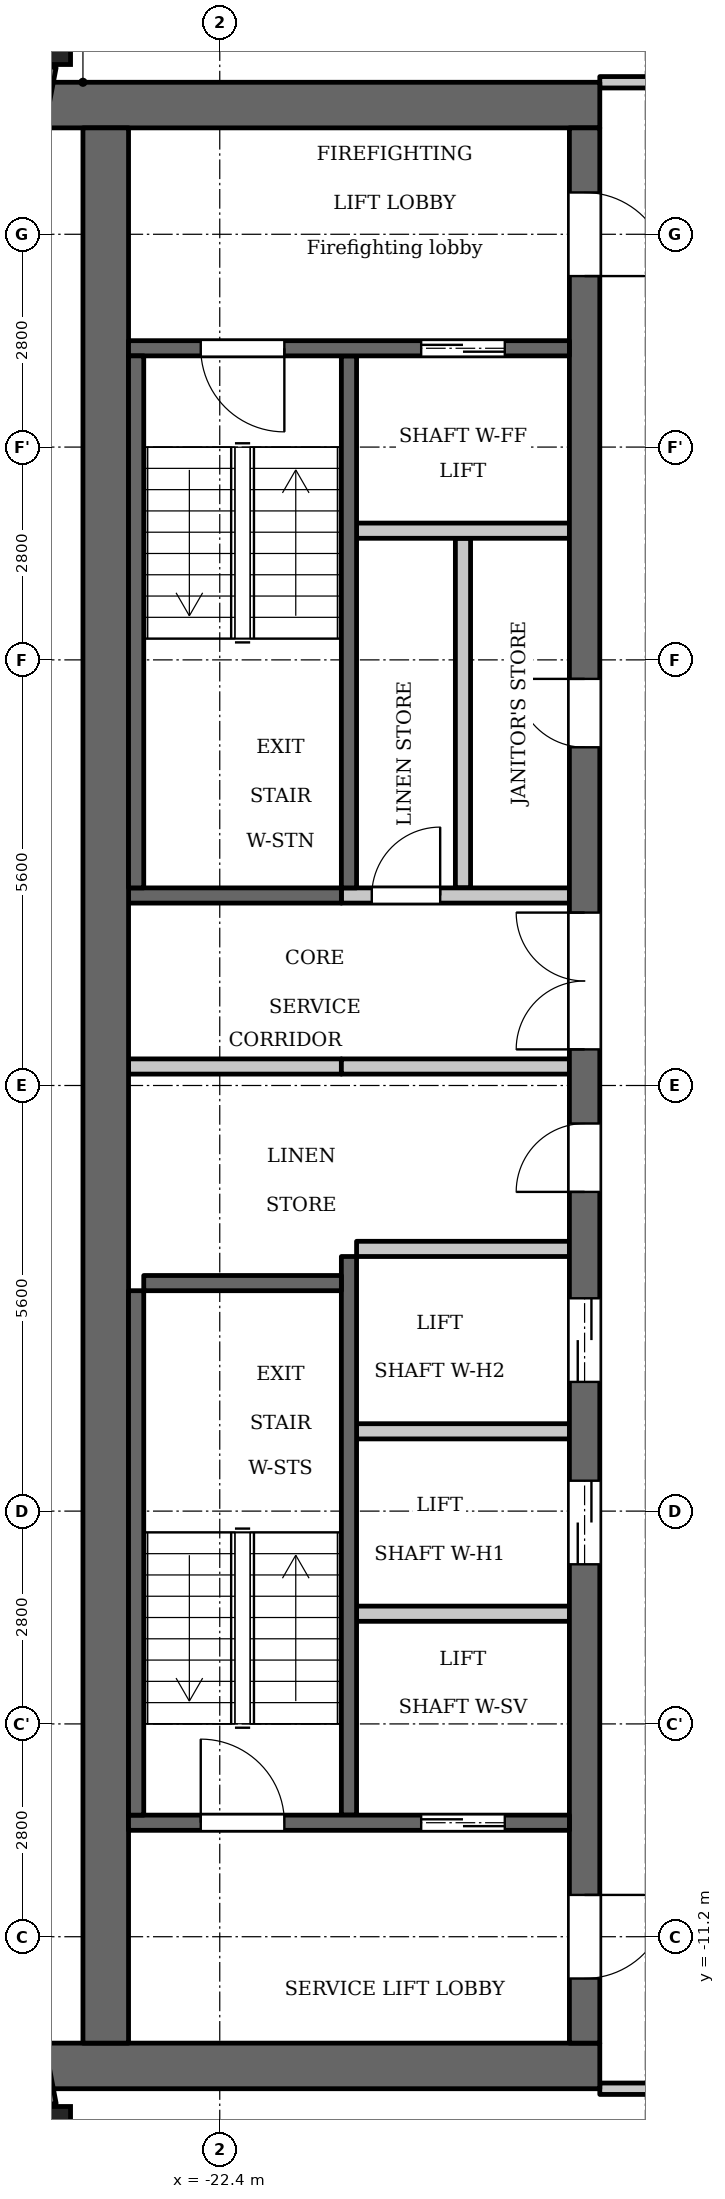
"""IFC4 building model, lengths in metres.
Left out: names, types, materials, properties, quantities, classifications, styles, units other than length and angle.
Written with IfcOpenShell. Run it as: python <this file> out.ifc"""

import sys

from ifc_helpers import new_model, si_unit, direction, frame, frame_2d, origin, origin_2d, place, context, subcontext, project, spatial, rectangle, extrude, element, fill, save


model = new_model("IFC4")
c1 = context("Model", 3, precision=1e-05, world=origin(), true_north=direction((0.0, 1.0)))
c2 = subcontext(c1, "Body", "Model", "MODEL_VIEW")
j1 = project(units=[si_unit("LENGTHUNIT", "METRE"), si_unit("PLANEANGLEUNIT", "RADIAN")], contexts=[c1])
p1 = place(None, origin())
s1 = spatial("IfcSite", under=j1, at=p1, CompositionType="ELEMENT")
p2 = place(p1, origin())
s2 = spatial("IfcBuilding", under=s1, at=p2, CompositionType="ELEMENT")
p3 = place(p2, frame((0.0, 0.0, 280.2)))
s3 = spatial("IfcBuildingStorey", under=s2, at=p3, CompositionType="ELEMENT", Elevation=280.2)
for number, where, z_axis, x_axis in (
    (1, (-24.738, 13.809, 0.0), (0.0, 0.0, 1.0), (1.0, 0.0, 0.0)),
    (2, (-24.738, -13.809, 0.0), (0.0, 0.0, 1.0), (1.0, 0.0, 0.0)),
):
    element("IfcColumn", number, at=place(p3, frame(where, z_axis=z_axis, x_axis=x_axis)), inside=s3, PredefinedType="COLUMN", context=c2, shape_type="SweptSolid", body=[
        extrude(rectangle(XDim=0.75, YDim=0.75, at=origin_2d()), origin(), (0.0, 0.0, 1.0), 3.5),
    ])
for number, where, z_axis, x_axis in (
    (3, (-24.7, 13.42, 0.0), (0.0, 0.0, 1.0), (-0.187, -0.982, 0.0)),
    (4, (-25.053, -11.572, 0.0), (0.0, 0.0, 1.0), (0.187, -0.982, 0.0)),
):
    element("IfcWall", number, at=place(p3, frame(where, z_axis=z_axis, x_axis=x_axis)), inside=s3, PredefinedType="SOLIDWALL", context=c2, shape_type="SweptSolid", body=[
        extrude(rectangle(XDim=1.881, YDim=0.3, at=frame_2d((0.941, 0.0))), origin(), (0.0, 0.0, 1.0), 2.5),
    ])
p4 = place(p3, frame((-20.7, 2.6, 0.0), z_axis=(0.0, 0.0, 1.0), x_axis=(0.0, 1.0, 0.0)))
e5 = element("IfcWall", 5, at=p4, inside=s3, PredefinedType="SHEAR", context=c2, shape_type="SweptSolid", body=[
    extrude(rectangle(XDim=7.0, YDim=0.2, at=frame_2d((3.5, 0.0))), origin(), (0.0, 0.0, 1.0), 3.15),
])
p5 = place(p3, frame((-20.7, -9.6, 0.0), z_axis=(0.0, 0.0, 1.0), x_axis=(0.0, 1.0, 0.0)))
e6 = element("IfcWall", 6, at=p5, inside=s3, PredefinedType="SHEAR", context=c2, shape_type="SweptSolid", body=[
    extrude(rectangle(XDim=7.35, YDim=0.2, at=frame_2d((3.675, 0.0))), origin(), (0.0, 0.0, 1.0), 3.15),
])
p6 = place(p3, frame((-20.8, 2.5, 0.0), z_axis=(0.0, 0.0, 1.0), x_axis=(-1.0, 0.0, 0.0)))
e7 = element("IfcWall", 7, at=p6, inside=s3, PredefinedType="SHEAR", context=c2, shape_type="SweptSolid", body=[
    extrude(rectangle(XDim=2.8, YDim=0.2, at=frame_2d((1.4, 0.0))), origin(), (0.0, 0.0, 1.0), 3.15),
])
p7 = place(p3, frame((-20.8, 0.25, 0.0), z_axis=(0.0, 0.0, 1.0), x_axis=(-1.0, 0.0, 0.0)))
e8 = element("IfcWall", 8, at=p7, inside=s3, PredefinedType="PARTITIONING", context=c2, shape_type="SweptSolid", body=[
    extrude(rectangle(XDim=2.8, YDim=0.2, at=frame_2d((1.4, 0.0))), origin(), (0.0, 0.0, 1.0), 3.15),
])
for number, where, z_axis, x_axis in (
    (9, (-17.4, 12.9, 0.0), (0.0, 0.0, 1.0), (-1.0, 0.0, 0.0)),
    (10, (-17.4, -12.9, 0.0), (0.0, 0.0, 1.0), (-1.0, 0.0, 0.0)),
):
    element("IfcWall", number, at=place(p3, frame(where, z_axis=z_axis, x_axis=x_axis)), inside=s3, PredefinedType="SHEAR", context=c2, shape_type="SweptSolid", body=[
        extrude(rectangle(XDim=7.32, YDim=0.6, at=frame_2d((3.66, 0.0))), origin(), (0.0, 0.0, 1.0), 3.15),
    ])
p8 = place(p3, frame((-19.2, 2.6, 0.0), z_axis=(0.0, 0.0, 1.0), x_axis=(0.0, 1.0, 0.0)))
e11 = element("IfcWall", 11, at=p8, inside=s3, PredefinedType="PARTITIONING", context=c2, shape_type="SweptSolid", body=[
    extrude(rectangle(XDim=4.6, YDim=0.2, at=frame_2d((2.3, 0.0))), origin(), (0.0, 0.0, 1.0), 3.15),
])
p9 = place(p3, frame((-17.6, -12.6, 0.0), z_axis=(0.0, 0.0, 1.0), x_axis=(0.0, 1.0, 0.0)))
e12 = element("IfcWall", 12, at=p9, inside=s3, PredefinedType="SHEAR", context=c2, shape_type="SweptSolid", body=[
    extrude(rectangle(XDim=25.2, YDim=0.4, at=frame_2d((12.6, 0.0))), origin(), (0.0, 0.0, 1.0), 3.15),
])
p10 = place(p9, frame((6.3, 0.0, 0.0)))
e13 = element("IfcOpeningElement", 13, at=p10, cuts=e12, PredefinedType="OPENING", context=c2, shape_type="SweptSolid", body=[
    extrude(rectangle(XDim=1.1, YDim=2.1, at=frame_2d((0.55, 1.05))), frame((0.0, 0.21, 0.0), z_axis=(0.0, -1.0, 0.0), x_axis=(1.0, 0.0, 0.0)), (0.0, 0.0, 1.0), 0.42),
])
p11 = place(p9, frame((8.7, 0.0, 0.0)))
e14 = element("IfcOpeningElement", 14, at=p11, cuts=e12, PredefinedType="OPENING", context=c2, shape_type="SweptSolid", body=[
    extrude(rectangle(XDim=1.1, YDim=2.1, at=frame_2d((0.55, 1.05))), frame((0.0, 0.21, 0.0), z_axis=(0.0, -1.0, 0.0), x_axis=(1.0, 0.0, 0.0)), (0.0, 0.0, 1.0), 0.42),
])
p12 = place(p9, frame((11.2, 0.0, 0.0)))
e15 = element("IfcOpeningElement", 15, at=p12, cuts=e12, PredefinedType="OPENING", context=c2, shape_type="SweptSolid", body=[
    extrude(rectangle(XDim=0.9, YDim=2.1, at=frame_2d((0.45, 1.05))), frame((0.0, 0.21, 0.0), z_axis=(0.0, -1.0, 0.0), x_axis=(1.0, 0.0, 0.0)), (0.0, 0.0, 1.0), 0.42),
])
p13 = place(p9, frame((17.05, 0.0, 0.0)))
e16 = element("IfcOpeningElement", 16, at=p13, cuts=e12, PredefinedType="OPENING", context=c2, shape_type="SweptSolid", body=[
    extrude(rectangle(XDim=0.9, YDim=2.1, at=frame_2d((0.45, 1.05))), frame((0.0, 0.21, 0.0), z_axis=(0.0, -1.0, 0.0), x_axis=(1.0, 0.0, 0.0)), (0.0, 0.0, 1.0), 0.42),
])
p14 = place(p9, frame((23.25, 0.0, 0.0)))
e17 = element("IfcOpeningElement", 17, at=p14, cuts=e12, PredefinedType="OPENING", context=c2, shape_type="SweptSolid", body=[
    extrude(rectangle(XDim=1.1, YDim=2.1, at=frame_2d((0.55, 1.05))), frame((0.0, 0.21, 0.0), z_axis=(0.0, -1.0, 0.0), x_axis=(1.0, 0.0, 0.0)), (0.0, 0.0, 1.0), 0.42),
])
p15 = place(p9, frame((0.85, 0.0, 0.0)))
e18 = element("IfcOpeningElement", 18, at=p15, cuts=e12, PredefinedType="OPENING", context=c2, shape_type="SweptSolid", body=[
    extrude(rectangle(XDim=1.1, YDim=2.1, at=frame_2d((0.55, 1.05))), frame((0.0, 0.21, 0.0), z_axis=(0.0, -1.0, 0.0), x_axis=(1.0, 0.0, 0.0)), (0.0, 0.0, 1.0), 0.42),
])
p16 = place(p9, frame((13.075, 0.0, 0.0)))
e19 = element("IfcOpeningElement", 19, at=p16, cuts=e12, PredefinedType="OPENING", context=c2, shape_type="SweptSolid", body=[
    extrude(rectangle(XDim=1.8, YDim=2.1, at=frame_2d((0.9, 1.05))), frame((0.0, 0.21, 0.0), z_axis=(0.0, -1.0, 0.0), x_axis=(1.0, 0.0, 0.0)), (0.0, 0.0, 1.0), 0.42),
])
p17 = place(p3, frame((-23.9, -12.6, 0.0), z_axis=(0.0, 0.0, 1.0), x_axis=(0.0, 1.0, 0.0)))
e20 = element("IfcWall", 20, at=p17, inside=s3, PredefinedType="SHEAR", context=c2, shape_type="SweptSolid", body=[
    extrude(rectangle(XDim=25.2, YDim=0.6, at=frame_2d((12.6, 0.0))), origin(), (0.0, 0.0, 1.0), 3.15),
])
p18 = place(p3, frame((-17.8, -9.7, 0.0), z_axis=(0.0, 0.0, 1.0), x_axis=(-1.0, 0.0, 0.0)))
e21 = element("IfcWall", 21, at=p18, inside=s3, PredefinedType="SHEAR", context=c2, shape_type="SweptSolid", body=[
    extrude(rectangle(XDim=5.8, YDim=0.2, at=frame_2d((2.9, 0.0))), origin(), (0.0, 0.0, 1.0), 3.15),
])
p19 = place(p18, frame((0.85, 0.0, 0.0)))
e22 = element("IfcOpeningElement", 22, at=p19, cuts=e21, PredefinedType="OPENING", context=c2, shape_type="SweptSolid", body=[
    extrude(rectangle(XDim=1.1, YDim=2.1, at=frame_2d((0.55, 1.05))), frame((0.0, 0.11, 0.0), z_axis=(0.0, -1.0, 0.0), x_axis=(1.0, 0.0, 0.0)), (0.0, 0.0, 1.0), 0.22),
])
p20 = place(p18, frame((3.75, 0.0, 0.0)))
e23 = element("IfcOpeningElement", 23, at=p20, cuts=e21, PredefinedType="OPENING", context=c2, shape_type="SweptSolid", body=[
    extrude(rectangle(XDim=1.1, YDim=2.1, at=frame_2d((0.55, 1.05))), frame((0.0, 0.11, 0.0), z_axis=(0.0, -1.0, 0.0), x_axis=(1.0, 0.0, 0.0)), (0.0, 0.0, 1.0), 0.22),
])
for number, where, z_axis, x_axis in (
    (24, (-17.8, -6.95, 0.0), (0.0, 0.0, 1.0), (-1.0, 0.0, 0.0)),
    (25, (-17.8, -4.55, 0.0), (0.0, 0.0, 1.0), (-1.0, 0.0, 0.0)),
    (26, (-17.8, -2.15, 0.0), (0.0, 0.0, 1.0), (-1.0, 0.0, 0.0)),
):
    element("IfcWall", number, at=place(p3, frame(where, z_axis=z_axis, x_axis=x_axis)), inside=s3, PredefinedType="PARTITIONING", context=c2, shape_type="SweptSolid", body=[
        extrude(rectangle(XDim=2.8, YDim=0.2, at=frame_2d((1.4, 0.0))), origin(), (0.0, 0.0, 1.0), 3.15),
    ])
p21 = place(p3, frame((-17.8, 0.25, 0.0), z_axis=(0.0, 0.0, 1.0), x_axis=(-1.0, 0.0, 0.0)))
e27 = element("IfcWall", 27, at=p21, inside=s3, PredefinedType="PARTITIONING", context=c2, shape_type="SweptSolid", body=[
    extrude(rectangle(XDim=3.0, YDim=0.2, at=frame_2d((1.5, 0.0))), origin(), (0.0, 0.0, 1.0), 3.15),
])
p22 = place(p3, frame((-17.8, 2.5, 0.0), z_axis=(0.0, 0.0, 1.0), x_axis=(-1.0, 0.0, 0.0)))
e28 = element("IfcWall", 28, at=p22, inside=s3, PredefinedType="PARTITIONING", context=c2, shape_type="SweptSolid", body=[
    extrude(rectangle(XDim=3.0, YDim=0.2, at=frame_2d((1.5, 0.0))), origin(), (0.0, 0.0, 1.0), 3.15),
])
p23 = place(p22, frame((1.7, 0.0, 0.0)))
e29 = element("IfcOpeningElement", 29, at=p23, cuts=e28, PredefinedType="OPENING", context=c2, shape_type="SweptSolid", body=[
    extrude(rectangle(XDim=0.9, YDim=2.1, at=frame_2d((0.45, 1.05))), frame((0.0, 0.11, 0.0), z_axis=(0.0, -1.0, 0.0), x_axis=(1.0, 0.0, 0.0)), (0.0, 0.0, 1.0), 0.22),
])
p24 = place(p3, frame((-17.8, 7.3, 0.0), z_axis=(0.0, 0.0, 1.0), x_axis=(-1.0, 0.0, 0.0)))
e30 = element("IfcWall", 30, at=p24, inside=s3, PredefinedType="PARTITIONING", context=c2, shape_type="SweptSolid", body=[
    extrude(rectangle(XDim=2.8, YDim=0.2, at=frame_2d((1.4, 0.0))), origin(), (0.0, 0.0, 1.0), 3.15),
])
p25 = place(p3, frame((-17.8, 9.7, 0.0), z_axis=(0.0, 0.0, 1.0), x_axis=(-1.0, 0.0, 0.0)))
e31 = element("IfcWall", 31, at=p25, inside=s3, PredefinedType="SHEAR", context=c2, shape_type="SweptSolid", body=[
    extrude(rectangle(XDim=5.8, YDim=0.2, at=frame_2d((2.9, 0.0))), origin(), (0.0, 0.0, 1.0), 3.15),
])
p26 = place(p25, frame((0.85, 0.0, 0.0)))
e32 = element("IfcOpeningElement", 32, at=p26, cuts=e31, PredefinedType="OPENING", context=c2, shape_type="SweptSolid", body=[
    extrude(rectangle(XDim=1.1, YDim=2.1, at=frame_2d((0.55, 1.05))), frame((0.0, 0.11, 0.0), z_axis=(0.0, -1.0, 0.0), x_axis=(1.0, 0.0, 0.0)), (0.0, 0.0, 1.0), 0.22),
])
p27 = place(p25, frame((3.75, 0.0, 0.0)))
e33 = element("IfcOpeningElement", 33, at=p27, cuts=e31, PredefinedType="OPENING", context=c2, shape_type="SweptSolid", body=[
    extrude(rectangle(XDim=1.1, YDim=2.1, at=frame_2d((0.55, 1.05))), frame((0.0, 0.11, 0.0), z_axis=(0.0, -1.0, 0.0), x_axis=(1.0, 0.0, 0.0)), (0.0, 0.0, 1.0), 0.22),
])
p28 = place(p3, frame((-23.5, 2.6, 0.0), z_axis=(0.0, 0.0, 1.0), x_axis=(0.0, 1.0, 0.0)))
e34 = element("IfcWall", 34, at=p28, inside=s3, PredefinedType="SHEAR", context=c2, shape_type="SweptSolid", body=[
    extrude(rectangle(XDim=7.0, YDim=0.2, at=frame_2d((3.5, 0.0))), origin(), (0.0, 0.0, 1.0), 3.15),
])
p29 = place(p3, frame((-23.5, -9.6, 0.0), z_axis=(0.0, 0.0, 1.0), x_axis=(0.0, 1.0, 0.0)))
e35 = element("IfcWall", 35, at=p29, inside=s3, PredefinedType="SHEAR", context=c2, shape_type="SweptSolid", body=[
    extrude(rectangle(XDim=6.9, YDim=0.2, at=frame_2d((3.45, 0.0))), origin(), (0.0, 0.0, 1.0), 3.15),
])
p30 = place(p3, frame((-20.8, -2.6, 0.0), z_axis=(0.0, 0.0, 1.0), x_axis=(-1.0, 0.0, 0.0)))
e36 = element("IfcWall", 36, at=p30, inside=s3, PredefinedType="SHEAR", context=c2, shape_type="SweptSolid", body=[
    extrude(rectangle(XDim=2.6, YDim=0.2, at=frame_2d((1.3, 0.0))), origin(), (0.0, 0.0, 1.0), 3.15),
])
p31 = place(p3, frame((-17.4, -13.2, 0.0), z_axis=(0.0, 0.0, 1.0), x_axis=(1.0, 0.0, 0.0)))
e37 = element("IfcWall", 37, at=p31, inside=s3, PredefinedType="PARTITIONING", context=c2, shape_type="SweptSolid", body=[
    extrude(rectangle(XDim=2.325, YDim=0.15, at=frame_2d((1.163, 0.0))), origin(), (0.0, 0.0, 1.0), 3.15),
])
p32 = place(p31, frame((0.65, 0.0, 0.0)))
e38 = element("IfcOpeningElement", 38, at=p32, cuts=e37, PredefinedType="OPENING", context=c2, shape_type="SweptSolid", body=[
    extrude(rectangle(XDim=1.0, YDim=2.1, at=frame_2d((0.5, 1.05))), frame((0.0, 0.085, 0.0), z_axis=(0.0, -1.0, 0.0), x_axis=(1.0, 0.0, 0.0)), (0.0, 0.0, 1.0), 0.17),
])
p33 = place(p3, frame((-17.4, 13.2, 0.0), z_axis=(0.0, 0.0, 1.0), x_axis=(1.0, 0.0, 0.0)))
e39 = element("IfcWall", 39, at=p33, inside=s3, PredefinedType="PARTITIONING", context=c2, shape_type="SweptSolid", body=[
    extrude(rectangle(XDim=2.325, YDim=0.15, at=frame_2d((1.163, 0.0))), origin(), (0.0, 0.0, 1.0), 3.15),
])
p34 = place(p33, frame((0.75, 0.0, 0.0)))
e40 = element("IfcOpeningElement", 40, at=p34, cuts=e39, PredefinedType="OPENING", context=c2, shape_type="SweptSolid", body=[
    extrude(rectangle(XDim=1.0, YDim=2.1, at=frame_2d((0.5, 1.05))), frame((0.0, 0.085, 0.0), z_axis=(0.0, -1.0, 0.0), x_axis=(1.0, 0.0, 0.0)), (0.0, 0.0, 1.0), 0.17),
])
p35 = place(p19, origin())
e41 = element("IfcDoor", 41, at=p35, inside=s3, OperationType="DOUBLE_DOOR_SLIDING", PredefinedType="DOOR", context=c2, shape_type="SweptSolid", body=[
    extrude(rectangle(XDim=1.1, YDim=2.1, at=frame_2d((0.55, 1.05))), frame((0.0, 0.025, 0.0), z_axis=(0.0, -1.0, 0.0), x_axis=(1.0, 0.0, 0.0)), (0.0, 0.0, 1.0), 0.05),
])
fill(e22, e41)
p36 = place(p10, origin())
e42 = element("IfcDoor", 42, at=p36, inside=s3, OperationType="DOUBLE_DOOR_SLIDING", PredefinedType="DOOR", context=c2, shape_type="SweptSolid", body=[
    extrude(rectangle(XDim=1.1, YDim=2.1, at=frame_2d((0.55, 1.05))), frame((0.0, 0.025, 0.0), z_axis=(0.0, -1.0, 0.0), x_axis=(1.0, 0.0, 0.0)), (0.0, 0.0, 1.0), 0.05),
])
fill(e13, e42)
p37 = place(p11, origin())
e43 = element("IfcDoor", 43, at=p37, inside=s3, OperationType="DOUBLE_DOOR_SLIDING", PredefinedType="DOOR", context=c2, shape_type="SweptSolid", body=[
    extrude(rectangle(XDim=1.1, YDim=2.1, at=frame_2d((0.55, 1.05))), frame((0.0, 0.025, 0.0), z_axis=(0.0, -1.0, 0.0), x_axis=(1.0, 0.0, 0.0)), (0.0, 0.0, 1.0), 0.05),
])
fill(e14, e43)
p38 = place(p12, origin())
e44 = element("IfcDoor", 44, at=p38, inside=s3, OperationType="SINGLE_SWING_RIGHT", PredefinedType="DOOR", context=c2, shape_type="SweptSolid", body=[
    extrude(rectangle(XDim=0.9, YDim=2.1, at=frame_2d((0.45, 1.05))), frame((0.0, 0.025, 0.0), z_axis=(0.0, -1.0, 0.0), x_axis=(1.0, 0.0, 0.0)), (0.0, 0.0, 1.0), 0.05),
])
fill(e15, e44)
p39 = place(p13, origin())
e45 = element("IfcDoor", 45, at=p39, inside=s3, OperationType="SINGLE_SWING_LEFT", PredefinedType="DOOR", context=c2, shape_type="SweptSolid", body=[
    extrude(rectangle(XDim=0.9, YDim=2.1, at=frame_2d((0.45, 1.05))), frame((0.0, 0.025, 0.0), z_axis=(0.0, -1.0, 0.0), x_axis=(1.0, 0.0, 0.0)), (0.0, 0.0, 1.0), 0.05),
])
fill(e16, e45)
p40 = place(p23, origin())
e46 = element("IfcDoor", 46, at=p40, inside=s3, OperationType="SINGLE_SWING_LEFT", PredefinedType="DOOR", context=c2, shape_type="SweptSolid", body=[
    extrude(rectangle(XDim=0.9, YDim=2.1, at=frame_2d((0.45, 1.05))), frame((0.0, 0.025, 0.0), z_axis=(0.0, -1.0, 0.0), x_axis=(1.0, 0.0, 0.0)), (0.0, 0.0, 1.0), 0.05),
])
fill(e29, e46)
p41 = place(p26, origin())
e47 = element("IfcDoor", 47, at=p41, inside=s3, OperationType="DOUBLE_DOOR_SLIDING", PredefinedType="DOOR", context=c2, shape_type="SweptSolid", body=[
    extrude(rectangle(XDim=1.1, YDim=2.1, at=frame_2d((0.55, 1.05))), frame((0.0, 0.025, 0.0), z_axis=(0.0, -1.0, 0.0), x_axis=(1.0, 0.0, 0.0)), (0.0, 0.0, 1.0), 0.05),
])
fill(e32, e47)
p42 = place(p14, origin())
e48 = element("IfcDoor", 48, at=p42, inside=s3, OperationType="SINGLE_SWING_LEFT", PredefinedType="DOOR", context=c2, shape_type="SweptSolid", body=[
    extrude(rectangle(XDim=1.1, YDim=2.1, at=frame_2d((0.55, 1.05))), frame((0.0, 0.025, 0.0), z_axis=(0.0, -1.0, 0.0), x_axis=(1.0, 0.0, 0.0)), (0.0, 0.0, 1.0), 0.05),
])
fill(e17, e48)
p43 = place(p15, origin())
e49 = element("IfcDoor", 49, at=p43, inside=s3, OperationType="SINGLE_SWING_RIGHT", PredefinedType="DOOR", context=c2, shape_type="SweptSolid", body=[
    extrude(rectangle(XDim=1.1, YDim=2.1, at=frame_2d((0.55, 1.05))), frame((0.0, 0.025, 0.0), z_axis=(0.0, -1.0, 0.0), x_axis=(1.0, 0.0, 0.0)), (0.0, 0.0, 1.0), 0.05),
])
fill(e18, e49)
p44 = place(p27, origin())
e50 = element("IfcDoor", 50, at=p44, inside=s3, OperationType="SINGLE_SWING_RIGHT", PredefinedType="DOOR", context=c2, shape_type="SweptSolid", body=[
    extrude(rectangle(XDim=1.1, YDim=2.1, at=frame_2d((0.55, 1.05))), frame((0.0, 0.025, 0.0), z_axis=(0.0, -1.0, 0.0), x_axis=(1.0, 0.0, 0.0)), (0.0, 0.0, 1.0), 0.05),
])
fill(e33, e50)
p45 = place(p20, origin())
e51 = element("IfcDoor", 51, at=p45, inside=s3, OperationType="SINGLE_SWING_RIGHT", PredefinedType="DOOR", context=c2, shape_type="SweptSolid", body=[
    extrude(rectangle(XDim=1.1, YDim=2.1, at=frame_2d((0.55, 1.05))), frame((0.0, 0.025, 0.0), z_axis=(0.0, -1.0, 0.0), x_axis=(1.0, 0.0, 0.0)), (0.0, 0.0, 1.0), 0.05),
])
fill(e23, e51)
p46 = place(p16, origin())
e52 = element("IfcDoor", 52, at=p46, inside=s3, OperationType="DOUBLE_DOOR_SINGLE_SWING", PredefinedType="DOOR", context=c2, shape_type="SweptSolid", body=[
    extrude(rectangle(XDim=1.8, YDim=2.1, at=frame_2d((0.9, 1.05))), frame((0.0, 0.025, 0.0), z_axis=(0.0, -1.0, 0.0), x_axis=(1.0, 0.0, 0.0)), (0.0, 0.0, 1.0), 0.05),
])
fill(e19, e52)
save(model, sys.argv[1])
